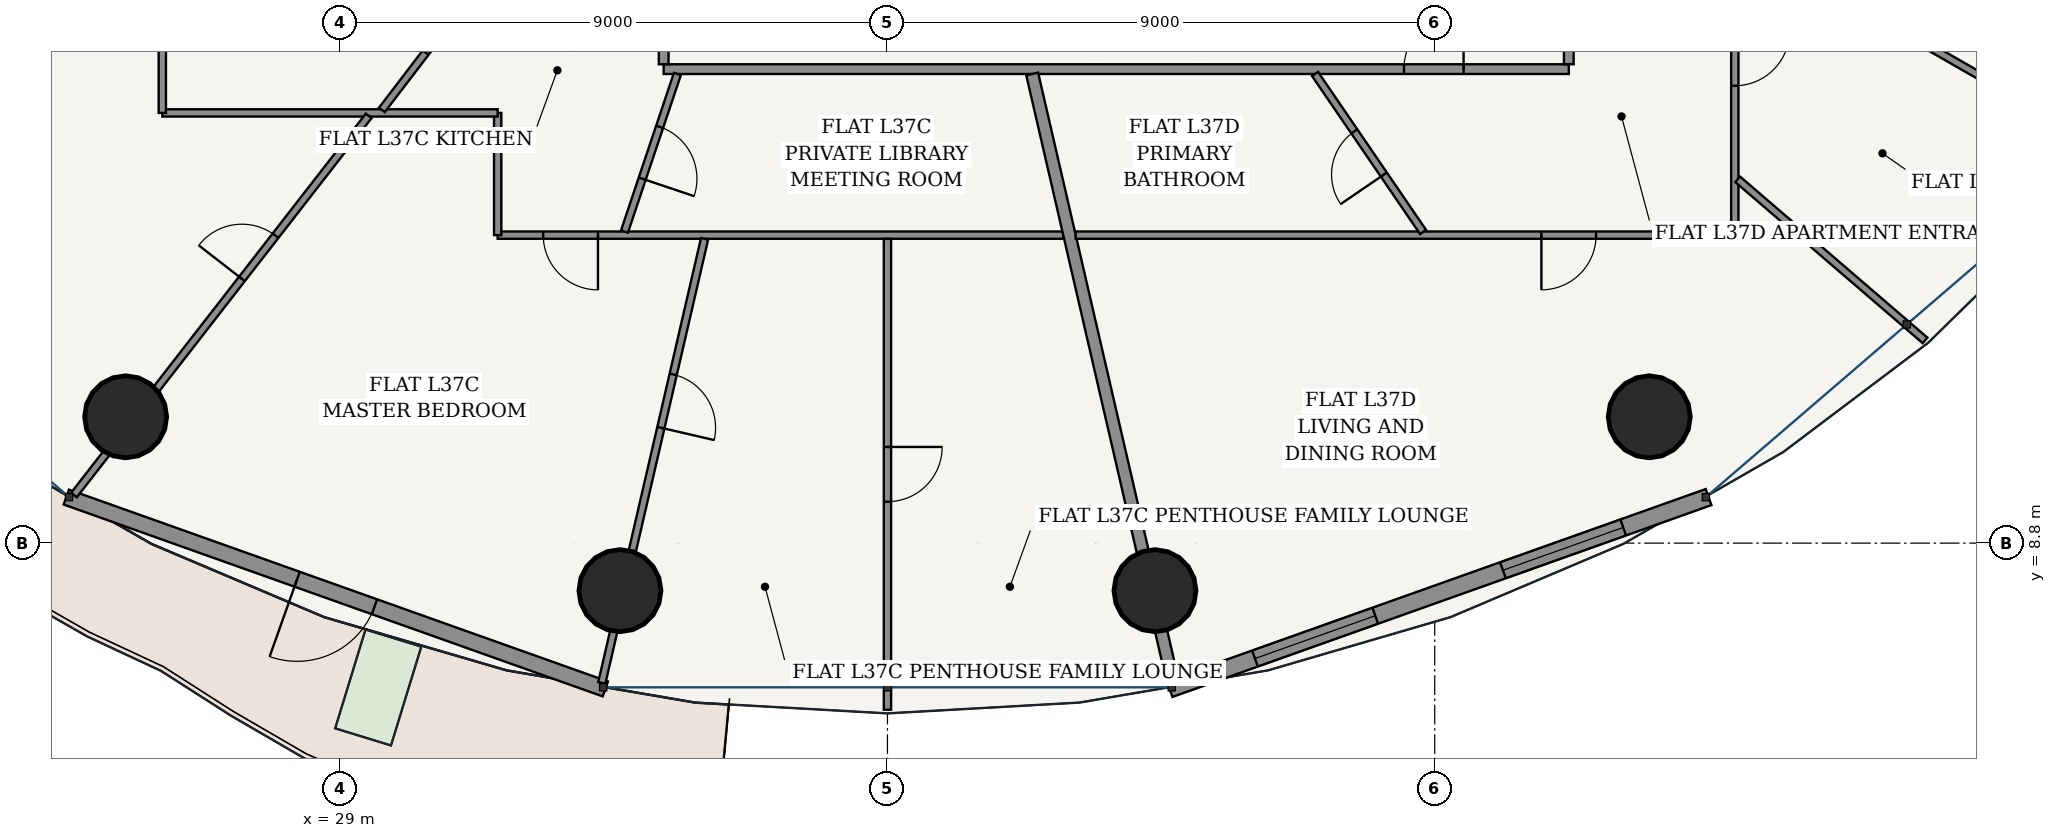
"""IFC4 building model, lengths in metres.
Left out: names, types, materials, properties, quantities, classifications, styles, units other than length and angle.
Written with IfcOpenShell. Run it as: python <this file> out.ifc"""

import sys

from ifc_helpers import new_model, si_unit, direction, frame, frame_2d, origin, origin_2d, place, context, subcontext, project, spatial, rectangle, hollow_circle, extrude, source, transform, mapped, element, fill, save


model = new_model("IFC4")
c1 = context("Model", 3, precision=1e-05, world=origin(), true_north=direction((-0.2419218956, 0.970295726276)))
c2 = subcontext(c1, "Body", "Model", "MODEL_VIEW")
j1 = project(units=[si_unit("LENGTHUNIT", "METRE"), si_unit("PLANEANGLEUNIT", "RADIAN")], contexts=[c1])
p1 = place(None, origin())
s1 = spatial("IfcSite", under=j1, at=p1, CompositionType="ELEMENT")
p2 = place(p1, origin())
s2 = spatial("IfcBuilding", under=s1, at=p2, CompositionType="ELEMENT")
p3 = place(p2, frame((0.0, 0.0, 142.6)))
s3 = spatial("IfcBuildingStorey", under=s2, at=p3, CompositionType="ELEMENT", Elevation=142.6)
for number, where, z_axis, x_axis in (
    (1, (25.472, 10.877, 0.0), (0.0, 0.0, 1.0), (1.0, 0.0, 0.0)),
    (2, (33.601, 8.018, 0.0), (0.0, 0.0, 1.0), (1.0, 0.0, 0.0)),
    (3, (42.399, 8.018, 0.0), (0.0, 0.0, 1.0), (1.0, 0.0, 0.0)),
    (4, (50.528, 10.877, 0.0), (0.0, 0.0, 1.0), (1.0, 0.0, 0.0)),
):
    element("IfcColumn", number, at=place(p3, frame(where, z_axis=z_axis, x_axis=x_axis)), inside=s3, PredefinedType="COLUMN", context=c2, shape_type="SweptSolid", body=[
        extrude(hollow_circle(Radius=0.675, WallThickness=0.042, at=origin_2d()), origin(), (0.0, 0.0, 1.0), 3.6),
    ])
p4 = place(p3, frame((24.497, 9.557, 0.0), z_axis=(0.0, 0.0, 1.0), x_axis=(0.942103604331, -0.335321932934, 0.0)))
e5 = element("IfcWall", 5, at=p4, inside=s3, PredefinedType="SOLIDWALL", context=c2, shape_type="SweptSolid", body=[
    extrude(rectangle(XDim=9.408, YDim=0.26, at=frame_2d((4.704, 0.0))), origin(), (0.0, 0.0, 1.0), 3.33),
])
p5 = place(p4, frame((4.029, 0.0, 0.0)))
e6 = element("IfcOpeningElement", 6, at=p5, cuts=e5, PredefinedType="OPENING", context=c2, shape_type="SweptSolid", body=[
    extrude(rectangle(XDim=1.35, YDim=2.2, at=frame_2d((0.675, 1.1))), frame((0.0, 0.14, 0.0), z_axis=(0.0, -1.0, 0.0), x_axis=(1.0, 0.0, 0.0)), (0.0, 0.0, 1.0), 0.28),
])
p6 = place(p3, frame((42.64, 6.402, 0.0), z_axis=(0.0, 0.0, 1.0), x_axis=(0.942103604331, 0.335321932934, 0.0)))
e7 = element("IfcWall", 7, at=p6, inside=s3, PredefinedType="SOLIDWALL", context=c2, shape_type="SweptSolid", body=[
    extrude(rectangle(XDim=9.408, YDim=0.28, at=frame_2d((4.704, 0.0))), origin(), (0.0, 0.0, 1.0), 3.33),
])
p7 = place(p6, frame((1.49, 0.0, 0.85)))
e8 = element("IfcOpeningElement", 8, at=p7, cuts=e7, PredefinedType="OPENING", context=c2, shape_type="SweptSolid", body=[
    extrude(rectangle(XDim=2.1, YDim=1.95, at=frame_2d((1.05, 0.975))), frame((0.0, 0.15, 0.0), z_axis=(0.0, -1.0, 0.0), x_axis=(1.0, 0.0, 0.0)), (0.0, 0.0, 1.0), 0.3),
])
p8 = place(p6, frame((5.818, 0.0, 0.85)))
e9 = element("IfcOpeningElement", 9, at=p8, cuts=e7, PredefinedType="OPENING", context=c2, shape_type="SweptSolid", body=[
    extrude(rectangle(XDim=2.1, YDim=1.95, at=frame_2d((1.05, 0.975))), frame((0.0, 0.15, 0.0), z_axis=(0.0, -1.0, 0.0), x_axis=(1.0, 0.0, 0.0)), (0.0, 0.0, 1.0), 0.3),
])
p9 = place(p3, frame((34.32, 16.595, 0.0), z_axis=(0.0, 0.0, 1.0), x_axis=(1.0, 0.0, 0.0)))
e10 = element("IfcWall", 10, at=p9, inside=s3, PredefinedType="PARTITIONING", context=c2, shape_type="SweptSolid", body=[
    extrude(rectangle(XDim=14.885, YDim=0.16, at=frame_2d((7.442, 0.0))), origin(), (0.0, 0.0, 1.0), 2.776),
])
p10 = place(p9, frame((12.174, 0.0, 0.0)))
e11 = element("IfcOpeningElement", 11, at=p10, cuts=e10, PredefinedType="OPENING", context=c2, shape_type="SweptSolid", body=[
    extrude(rectangle(XDim=0.98, YDim=2.2, at=frame_2d((0.49, 1.1))), frame((0.0, 0.09, 0.0), z_axis=(0.0, -1.0, 0.0), x_axis=(1.0, 0.0, 0.0)), (0.0, 0.0, 1.0), 0.18),
])
p11 = place(p3, frame((34.32, 16.675, 0.0), z_axis=(0.0, 0.0, 1.0), x_axis=(0.0, 1.0, 0.0)))
e12 = element("IfcWall", 12, at=p11, inside=s3, PredefinedType="PARTITIONING", context=c2, shape_type="SweptSolid", body=[
    extrude(rectangle(XDim=1.85, YDim=0.16, at=frame_2d((0.925, 0.0))), origin(), (0.0, 0.0, 1.0), 3.33),
])
p12 = place(p11, frame((0.435, 0.0, 0.0)))
e13 = element("IfcOpeningElement", 13, at=p12, cuts=e12, PredefinedType="OPENING", context=c2, shape_type="SweptSolid", body=[
    extrude(rectangle(XDim=0.98, YDim=2.2, at=frame_2d((0.49, 1.1))), frame((0.0, 0.09, 0.0), z_axis=(0.0, -1.0, 0.0), x_axis=(1.0, 0.0, 0.0)), (0.0, 0.0, 1.0), 0.18),
])
p13 = place(p3, frame((49.205, 16.675, 0.0), z_axis=(0.0, 0.0, 1.0), x_axis=(0.0, 1.0, 0.0)))
e14 = element("IfcWall", 14, at=p13, inside=s3, PredefinedType="PARTITIONING", context=c2, shape_type="SweptSolid", body=[
    extrude(rectangle(XDim=18.4, YDim=0.16, at=frame_2d((9.2, 0.0))), origin(), (0.0, 0.0, 1.0), 2.776),
])
p14 = place(p3, frame((40.892, 13.865, 0.0), z_axis=(0.0, 0.0, 1.0), x_axis=(-1.0, 0.0, 0.0)))
e15 = element("IfcWall", 15, at=p14, inside=s3, PredefinedType="PARTITIONING", context=c2, shape_type="SweptSolid", body=[
    extrude(rectangle(XDim=9.302, YDim=0.12, at=frame_2d((4.651, 0.0))), origin(), (0.0, 0.0, 1.0), 2.776),
])
p15 = place(p14, frame((7.652, 0.0, 0.0)))
e16 = element("IfcOpeningElement", 16, at=p15, cuts=e15, PredefinedType="OPENING", context=c2, shape_type="SweptSolid", body=[
    extrude(rectangle(XDim=0.9, YDim=2.15, at=frame_2d((0.45, 1.075))), frame((0.0, 0.07, 0.0), z_axis=(0.0, -1.0, 0.0), x_axis=(1.0, 0.0, 0.0)), (0.0, 0.0, 1.0), 0.14),
])
p16 = place(p3, frame((31.59, 13.865, 0.0), z_axis=(0.0, 0.0, 1.0), x_axis=(0.0, 1.0, 0.0)))
e17 = element("IfcWall", 17, at=p16, inside=s3, PredefinedType="PARTITIONING", context=c2, shape_type="SweptSolid", body=[
    extrude(rectangle(XDim=2.01, YDim=0.12, at=frame_2d((1.005, 0.0))), origin(), (0.0, 0.0, 1.0), 3.005),
])
p17 = place(p3, frame((31.59, 15.875, 0.0), z_axis=(0.0, 0.0, 1.0), x_axis=(-1.0, 0.0, 0.0)))
e18 = element("IfcWall", 18, at=p17, inside=s3, PredefinedType="PARTITIONING", context=c2, shape_type="SweptSolid", body=[
    extrude(rectangle(XDim=5.515, YDim=0.12, at=frame_2d((2.758, 0.0))), origin(), (0.0, 0.0, 1.0), 2.776),
])
p18 = place(p3, frame((26.075, 15.875, 0.0), z_axis=(0.0, 0.0, 1.0), x_axis=(0.0, 1.0, 0.0)))
e19 = element("IfcWall", 19, at=p18, inside=s3, PredefinedType="PARTITIONING", context=c2, shape_type="SweptSolid", body=[
    extrude(rectangle(XDim=5.715, YDim=0.12, at=frame_2d((2.857, 0.0))), origin(), (0.0, 0.0, 1.0), 2.776),
])
p19 = place(p3, frame((29.469, 15.826, 0.0), z_axis=(0.0, 0.0, 1.0), x_axis=(-0.61373942367, -0.789508657225, 0.0)))
e20 = element("IfcWall", 20, at=p19, inside=s3, PredefinedType="PARTITIONING", context=c2, shape_type="SweptSolid", body=[
    extrude(rectangle(XDim=7.898, YDim=0.12, at=frame_2d((3.949, 0.0))), origin(), (0.0, 0.0, 1.0), 2.776),
])
p20 = place(p19, frame((2.496, 0.0, 0.0)))
e21 = element("IfcOpeningElement", 21, at=p20, cuts=e20, PredefinedType="OPENING", context=c2, shape_type="SweptSolid", body=[
    extrude(rectangle(XDim=0.9, YDim=2.15, at=frame_2d((0.45, 1.075))), frame((0.0, 0.07, 0.0), z_axis=(0.0, -1.0, 0.0), x_axis=(1.0, 0.0, 0.0)), (0.0, 0.0, 1.0), 0.14),
])
p21 = place(p3, frame((34.992, 13.805, 0.0), z_axis=(0.0, 0.0, 1.0), x_axis=(-0.225447000045, -0.974255433739, 0.0)))
e22 = element("IfcWall", 22, at=p21, inside=s3, PredefinedType="PARTITIONING", context=c2, shape_type="SweptSolid", body=[
    extrude(rectangle(XDim=7.496, YDim=0.12, at=frame_2d((3.748, 0.0))), origin(), (0.0, 0.0, 1.0), 2.776),
])
p22 = place(p21, frame((2.289, 0.0, 0.0)))
e23 = element("IfcOpeningElement", 23, at=p22, cuts=e22, PredefinedType="OPENING", context=c2, shape_type="SweptSolid", body=[
    extrude(rectangle(XDim=0.9, YDim=2.15, at=frame_2d((0.45, 1.075))), frame((0.0, 0.07, 0.0), z_axis=(0.0, -1.0, 0.0), x_axis=(1.0, 0.0, 0.0)), (0.0, 0.0, 1.0), 0.14),
])
p23 = place(p3, frame((38.0, 13.803, 0.0), z_axis=(0.0, 0.0, 1.0), x_axis=(0.0, -1.0, 0.0)))
e24 = element("IfcWall", 24, at=p23, inside=s3, PredefinedType="PARTITIONING", context=c2, shape_type="SweptSolid", body=[
    extrude(rectangle(XDim=7.743, YDim=0.12, at=frame_2d((3.872, 0.0))), origin(), (0.0, 0.0, 1.0), 2.846),
])
p24 = place(p23, frame((3.421, 0.0, 0.0)))
e25 = element("IfcOpeningElement", 25, at=p24, cuts=e24, PredefinedType="OPENING", context=c2, shape_type="SweptSolid", body=[
    extrude(rectangle(XDim=0.9, YDim=2.15, at=frame_2d((0.45, 1.075))), frame((0.0, 0.07, 0.0), z_axis=(0.0, -1.0, 0.0), x_axis=(1.0, 0.0, 0.0)), (0.0, 0.0, 1.0), 0.14),
])
p25 = place(p3, frame((31.674, 18.525, 0.0), z_axis=(0.0, 0.0, 1.0), x_axis=(-0.607372594471, -0.794417101708, 0.0)))
e26 = element("IfcWall", 26, at=p25, inside=s3, PredefinedType="PARTITIONING", context=c2, shape_type="SweptSolid", body=[
    extrude(rectangle(XDim=3.274, YDim=0.12, at=frame_2d((1.637, 0.0))), origin(), (0.0, 0.0, 1.0), 3.33),
])
p26 = place(p25, frame((1.187, 0.0, 0.0)))
e27 = element("IfcOpeningElement", 27, at=p26, cuts=e26, PredefinedType="OPENING", context=c2, shape_type="SweptSolid", body=[
    extrude(rectangle(XDim=0.9, YDim=2.15, at=frame_2d((0.45, 1.075))), frame((0.0, 0.07, 0.0), z_axis=(0.0, -1.0, 0.0), x_axis=(1.0, 0.0, 0.0)), (0.0, 0.0, 1.0), 0.14),
])
p27 = place(p3, frame((34.545, 16.515, 0.0), z_axis=(0.0, 0.0, 1.0), x_axis=(-0.318424178642, -0.947948333221, 0.0)))
e28 = element("IfcWall", 28, at=p27, inside=s3, PredefinedType="PARTITIONING", context=c2, shape_type="SweptSolid", body=[
    extrude(rectangle(XDim=2.733, YDim=0.12, at=frame_2d((1.367, 0.0))), origin(), (0.0, 0.0, 1.0), 3.33),
])
p28 = place(p27, frame((0.917, 0.0, 0.0)))
e29 = element("IfcOpeningElement", 29, at=p28, cuts=e28, PredefinedType="OPENING", context=c2, shape_type="SweptSolid", body=[
    extrude(rectangle(XDim=0.9, YDim=2.15, at=frame_2d((0.45, 1.075))), frame((0.0, 0.07, 0.0), z_axis=(0.0, -1.0, 0.0), x_axis=(1.0, 0.0, 0.0)), (0.0, 0.0, 1.0), 0.14),
])
p29 = place(p3, frame((40.38, 16.515, 0.0), z_axis=(0.0, 0.0, 1.0), x_axis=(0.225473598067, -0.974249278457, 0.0)))
e30 = element("IfcWall", 30, at=p29, inside=s3, PredefinedType="PARTITIONING", context=c2, shape_type="SweptSolid", body=[
    extrude(rectangle(XDim=10.278, YDim=0.2, at=frame_2d((5.139, 0.0))), origin(), (0.0, 0.0, 1.0), 2.776),
])
p30 = place(p3, frame((51.935, 29.08, 0.0), z_axis=(0.0, 0.0, 1.0), x_axis=(0.0, -1.0, 0.0)))
e31 = element("IfcWall", 31, at=p30, inside=s3, PredefinedType="PARTITIONING", context=c2, shape_type="SweptSolid", body=[
    extrude(rectangle(XDim=15.215, YDim=0.12, at=frame_2d((7.608, 0.0))), origin(), (0.0, 0.0, 1.0), 2.776),
])
p31 = place(p30, frame((11.859, 0.0, 0.0)))
e32 = element("IfcOpeningElement", 32, at=p31, cuts=e31, PredefinedType="OPENING", context=c2, shape_type="SweptSolid", body=[
    extrude(rectangle(XDim=0.9, YDim=2.15, at=frame_2d((0.45, 1.075))), frame((0.0, 0.07, 0.0), z_axis=(0.0, -1.0, 0.0), x_axis=(1.0, 0.0, 0.0)), (0.0, 0.0, 1.0), 0.14),
])
p32 = place(p30, frame((7.49, 0.0, 0.0)))
e33 = element("IfcOpeningElement", 33, at=p32, cuts=e31, PredefinedType="OPENING", context=c2, shape_type="SweptSolid", body=[
    extrude(rectangle(XDim=0.9, YDim=2.15, at=frame_2d((0.45, 1.075))), frame((0.0, 0.07, 0.0), z_axis=(0.0, -1.0, 0.0), x_axis=(1.0, 0.0, 0.0)), (0.0, 0.0, 1.0), 0.14),
])
p33 = place(p3, frame((51.935, 13.865, 0.0), z_axis=(0.0, 0.0, 1.0), x_axis=(-1.0, 0.0, 0.0)))
e34 = element("IfcWall", 34, at=p33, inside=s3, PredefinedType="PARTITIONING", context=c2, shape_type="SweptSolid", body=[
    extrude(rectangle(XDim=10.84, YDim=0.12, at=frame_2d((5.42, 0.0))), origin(), (0.0, 0.0, 1.0), 2.776),
])
p34 = place(p33, frame((2.281, 0.0, 0.0)))
e35 = element("IfcOpeningElement", 35, at=p34, cuts=e34, PredefinedType="OPENING", context=c2, shape_type="SweptSolid", body=[
    extrude(rectangle(XDim=0.9, YDim=2.15, at=frame_2d((0.45, 1.075))), frame((0.0, 0.07, 0.0), z_axis=(0.0, -1.0, 0.0), x_axis=(1.0, 0.0, 0.0)), (0.0, 0.0, 1.0), 0.14),
])
p35 = place(p3, frame((51.982, 14.782, 0.0), z_axis=(0.0, 0.0, 1.0), x_axis=(0.758356837469, -0.651839632935, 0.0)))
e36 = element("IfcWall", 36, at=p35, inside=s3, PredefinedType="PARTITIONING", context=c2, shape_type="SweptSolid", body=[
    extrude(rectangle(XDim=4.064, YDim=0.12, at=frame_2d((2.032, 0.0))), origin(), (0.0, 0.0, 1.0), 2.846),
])
p36 = place(p3, frame((51.989, 18.766, 0.0), z_axis=(0.0, 0.0, 1.0), x_axis=(0.86717064002, -0.498011125466, 0.0)))
e37 = element("IfcWall", 37, at=p36, inside=s3, PredefinedType="PARTITIONING", context=c2, shape_type="SweptSolid", body=[
    extrude(rectangle(XDim=6.961, YDim=0.12, at=frame_2d((3.48, 0.0))), origin(), (0.0, 0.0, 1.0), 2.776),
])
p37 = place(p3, frame((45.032, 16.515, 0.0), z_axis=(0.0, 0.0, 1.0), x_axis=(0.564486512722, -0.825442291717, 0.0)))
e38 = element("IfcWall", 38, at=p37, inside=s3, PredefinedType="PARTITIONING", context=c2, shape_type="SweptSolid", body=[
    extrude(rectangle(XDim=3.148, YDim=0.12, at=frame_2d((1.574, 0.0))), origin(), (0.0, 0.0, 1.0), 3.005),
])
p38 = place(p37, frame((1.144, 0.0, 0.0)))
e39 = element("IfcOpeningElement", 39, at=p38, cuts=e38, PredefinedType="OPENING", context=c2, shape_type="SweptSolid", body=[
    extrude(rectangle(XDim=0.86, YDim=2.15, at=frame_2d((0.43, 1.075))), frame((0.0, 0.07, 0.0), z_axis=(0.0, -1.0, 0.0), x_axis=(1.0, 0.0, 0.0)), (0.0, 0.0, 1.0), 0.14),
])
m1 = source(origin(), c2, "Body", "SweptSolid", [
    extrude(rectangle(XDim=1.35, YDim=2.2, at=frame_2d((0.675, 1.1))), frame((0.0, 0.025, 0.0), z_axis=(0.0, -1.0, 0.0), x_axis=(1.0, 0.0, 0.0)), (0.0, 0.0, 1.0), 0.05),
])
p39 = place(p5, frame((1.35, 0.0, 0.0), z_axis=(0.0, 0.0, 1.0), x_axis=(-1.0, 0.0, 0.0)))
e40 = element("IfcDoor", 40, at=p39, inside=s3, OperationType="SINGLE_SWING_RIGHT", PredefinedType="DOOR", context=c2, shape_type="MappedRepresentation", body=[
    mapped(m1, transform((0.0, 0.0, 0.0), scale=1.0)),
])
fill(e6, e40)
m2 = source(origin(), c2, "Body", "SweptSolid", [
    extrude(rectangle(XDim=2.1, YDim=1.95, at=frame_2d((1.05, 0.975))), frame((0.0, 0.03, 0.0), z_axis=(0.0, -1.0, 0.0), x_axis=(1.0, 0.0, 0.0)), (0.0, 0.0, 1.0), 0.06),
])
p40 = place(p7, origin())
e41 = element("IfcWindow", 41, at=p40, inside=s3, PartitioningType="SINGLE_PANEL", PredefinedType="WINDOW", context=c2, shape_type="MappedRepresentation", body=[
    mapped(m2, transform((0.0, 0.0, 0.0), scale=1.0)),
])
fill(e8, e41)
p41 = place(p8, origin())
e42 = element("IfcWindow", 42, at=p41, inside=s3, PartitioningType="SINGLE_PANEL", PredefinedType="WINDOW", context=c2, shape_type="MappedRepresentation", body=[
    mapped(m2, transform((0.0, 0.0, 0.0), scale=1.0)),
])
fill(e9, e42)
m3 = source(origin(), c2, "Body", "SweptSolid", [
    extrude(rectangle(XDim=0.9, YDim=2.15, at=frame_2d((0.45, 1.075))), frame((0.0, 0.025, 0.0), z_axis=(0.0, -1.0, 0.0), x_axis=(1.0, 0.0, 0.0)), (0.0, 0.0, 1.0), 0.05),
])
p42 = place(p26, frame((0.9, 0.0, 0.0), z_axis=(0.0, 0.0, 1.0), x_axis=(-1.0, 0.0, 0.0)))
e43 = element("IfcDoor", 43, at=p42, inside=s3, OperationType="SINGLE_SWING_LEFT", PredefinedType="DOOR", context=c2, shape_type="MappedRepresentation", body=[
    mapped(m3, transform((0.0, 0.0, 0.0), scale=1.0)),
])
fill(e27, e43)
p43 = place(p28, origin())
e44 = element("IfcDoor", 44, at=p43, inside=s3, OperationType="SINGLE_SWING_RIGHT", PredefinedType="DOOR", context=c2, shape_type="MappedRepresentation", body=[
    mapped(m3, transform((0.0, 0.0, 0.0), scale=1.0)),
])
fill(e29, e44)
p44 = place(p15, origin())
e45 = element("IfcDoor", 45, at=p44, inside=s3, OperationType="SINGLE_SWING_LEFT", PredefinedType="DOOR", context=c2, shape_type="MappedRepresentation", body=[
    mapped(m3, transform((0.0, 0.0, 0.0), scale=1.0)),
])
fill(e16, e45)
p45 = place(p20, frame((0.9, 0.0, 0.0), z_axis=(0.0, 0.0, 1.0), x_axis=(-1.0, 0.0, 0.0)))
e46 = element("IfcDoor", 46, at=p45, inside=s3, OperationType="SINGLE_SWING_LEFT", PredefinedType="DOOR", context=c2, shape_type="MappedRepresentation", body=[
    mapped(m3, transform((0.0, 0.0, 0.0), scale=1.0)),
])
fill(e21, e46)
p46 = place(p22, origin())
e47 = element("IfcDoor", 47, at=p46, inside=s3, OperationType="SINGLE_SWING_RIGHT", PredefinedType="DOOR", context=c2, shape_type="MappedRepresentation", body=[
    mapped(m3, transform((0.0, 0.0, 0.0), scale=1.0)),
])
fill(e23, e47)
p47 = place(p24, origin())
e48 = element("IfcDoor", 48, at=p47, inside=s3, OperationType="SINGLE_SWING_LEFT", PredefinedType="DOOR", context=c2, shape_type="MappedRepresentation", body=[
    mapped(m3, transform((0.0, 0.0, 0.0), scale=1.0)),
])
fill(e25, e48)
m4 = source(origin(), c2, "Body", "SweptSolid", [
    extrude(rectangle(XDim=0.98, YDim=2.2, at=frame_2d((0.49, 1.1))), frame((0.0, 0.025, 0.0), z_axis=(0.0, -1.0, 0.0), x_axis=(1.0, 0.0, 0.0)), (0.0, 0.0, 1.0), 0.05),
])
p48 = place(p10, origin())
e49 = element("IfcDoor", 49, at=p48, inside=s3, OperationType="SINGLE_SWING_RIGHT", PredefinedType="DOOR", context=c2, shape_type="MappedRepresentation", body=[
    mapped(m4, transform((0.0, 0.0, 0.0), scale=1.0)),
])
fill(e11, e49)
m5 = source(origin(), c2, "Body", "SweptSolid", [
    extrude(rectangle(XDim=0.86, YDim=2.15, at=frame_2d((0.43, 1.075))), frame((0.0, 0.025, 0.0), z_axis=(0.0, -1.0, 0.0), x_axis=(1.0, 0.0, 0.0)), (0.0, 0.0, 1.0), 0.05),
])
p49 = place(p38, frame((0.86, 0.0, 0.0), z_axis=(0.0, 0.0, 1.0), x_axis=(-1.0, 0.0, 0.0)))
e50 = element("IfcDoor", 50, at=p49, inside=s3, OperationType="SINGLE_SWING_LEFT", PredefinedType="DOOR", context=c2, shape_type="MappedRepresentation", body=[
    mapped(m5, transform((0.0, 0.0, 0.0), scale=1.0)),
])
fill(e39, e50)
p50 = place(p34, origin())
e51 = element("IfcDoor", 51, at=p50, inside=s3, OperationType="SINGLE_SWING_RIGHT", PredefinedType="DOOR", context=c2, shape_type="MappedRepresentation", body=[
    mapped(m3, transform((0.0, 0.0, 0.0), scale=1.0)),
])
fill(e35, e51)
p51 = place(p31, origin())
e52 = element("IfcDoor", 52, at=p51, inside=s3, OperationType="SINGLE_SWING_LEFT", PredefinedType="DOOR", context=c2, shape_type="MappedRepresentation", body=[
    mapped(m3, transform((0.0, 0.0, 0.0), scale=1.0)),
])
fill(e32, e52)
save(model, sys.argv[1])
